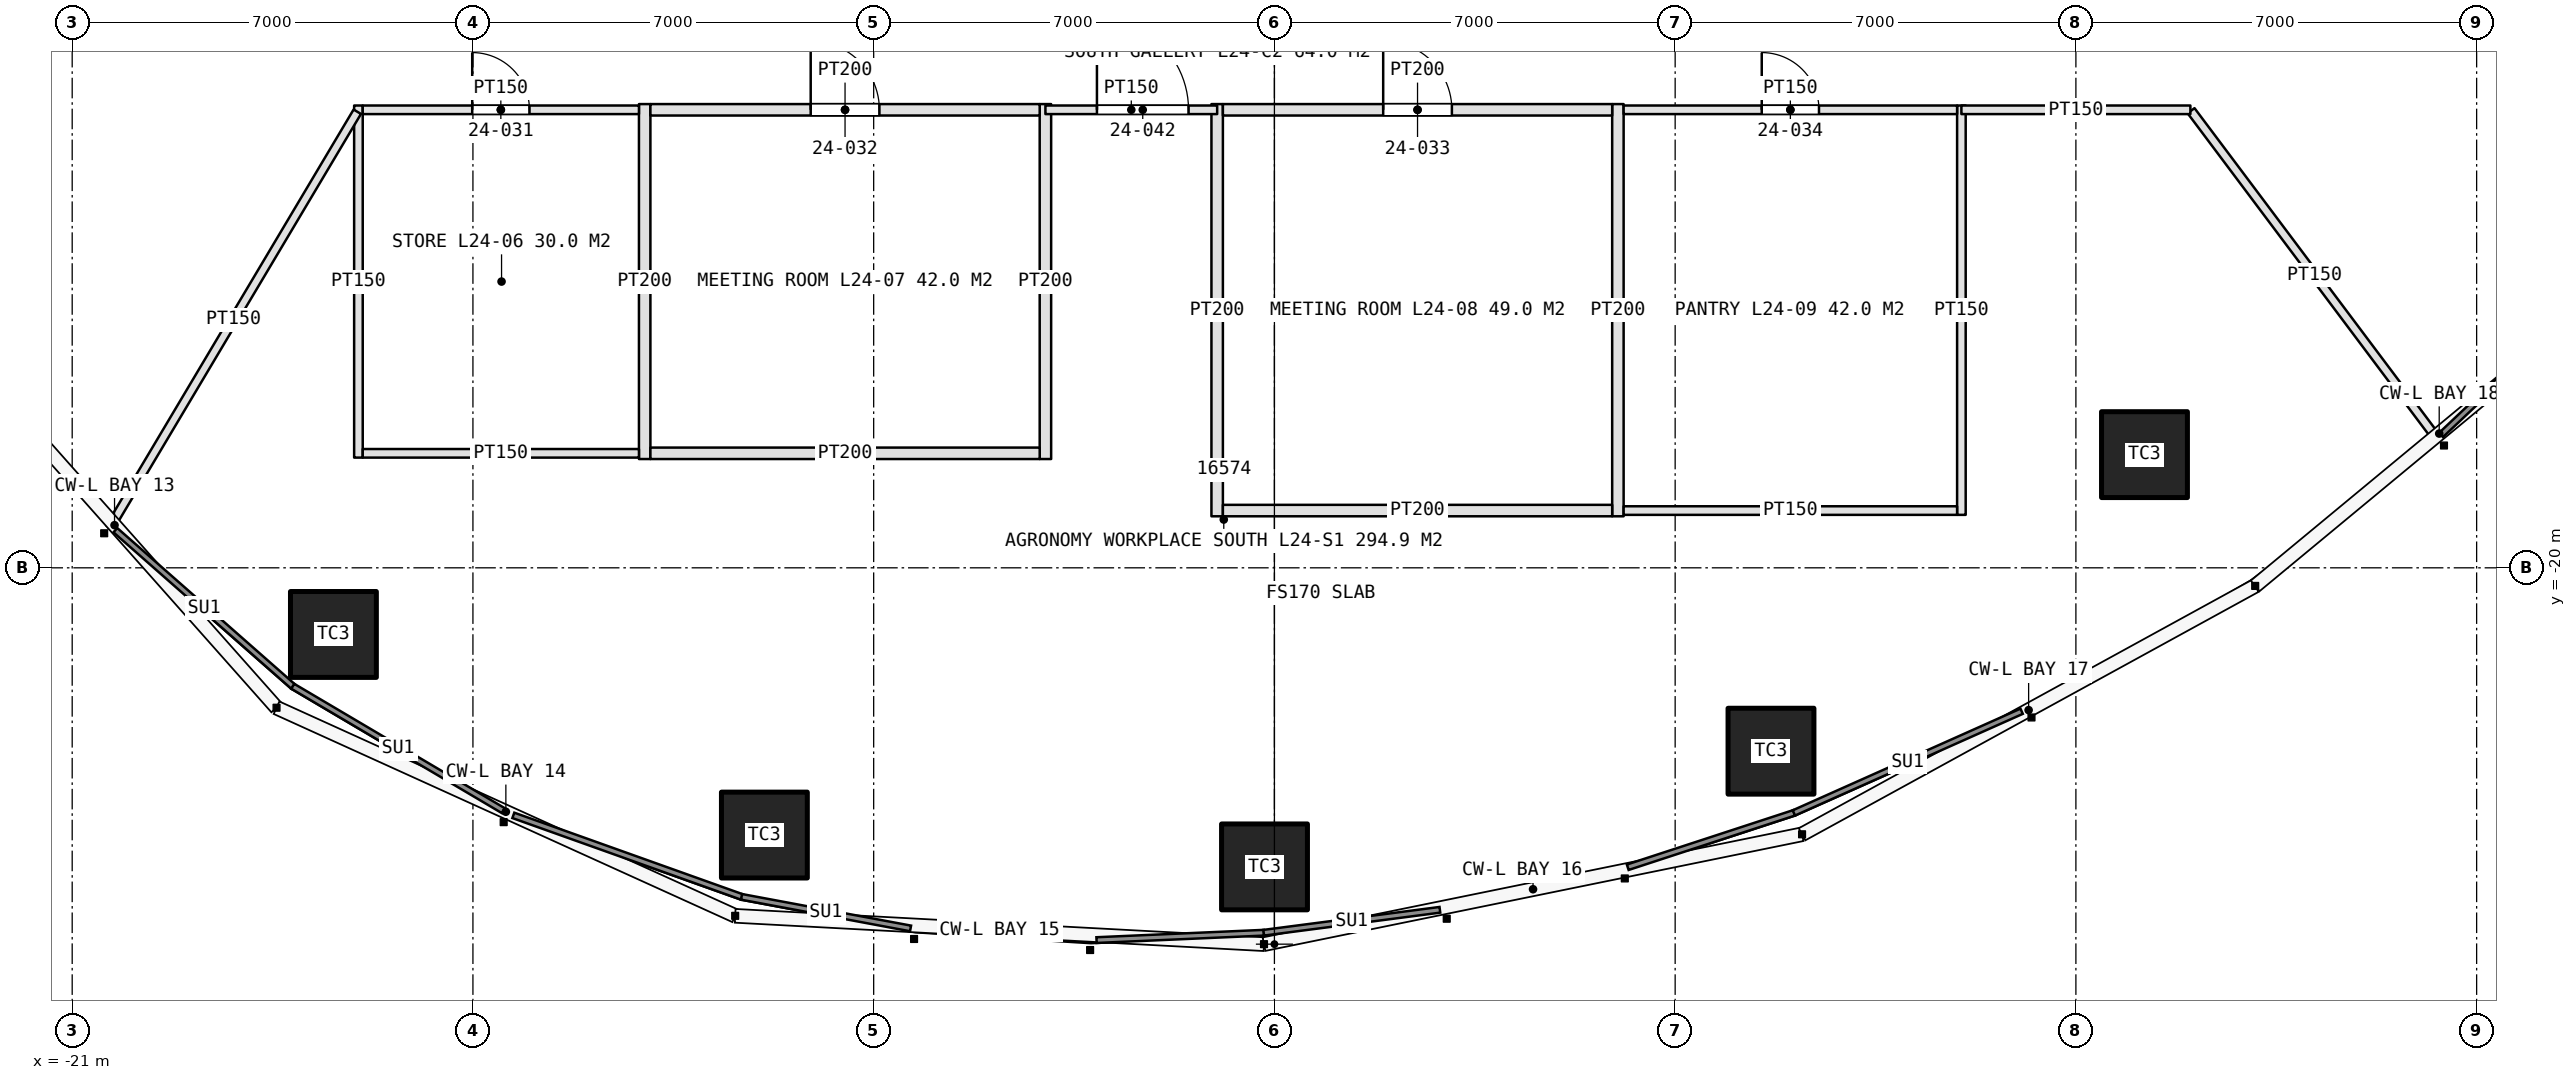
"""IFC4 building model, lengths in metres.
Left out: names, types, materials, properties, quantities, classifications, styles, units other than length and angle.
Written with IfcOpenShell. Run it as: python <this file> out.ifc"""

import sys

from ifc_helpers import new_model, si_unit, direction, frame, frame_2d, origin, origin_2d, place, context, subcontext, project, spatial, rectangle, extrude, element, fill, save


model = new_model("IFC4")
c1 = context("Model", 3, precision=1e-05, world=origin(), true_north=direction((0.0, 1.0)))
c2 = subcontext(c1, "Body", "Model", "MODEL_VIEW")
j1 = project(units=[si_unit("LENGTHUNIT", "METRE"), si_unit("PLANEANGLEUNIT", "RADIAN")], contexts=[c1])
p1 = place(None, origin())
s1 = spatial("IfcSite", under=j1, at=p1, CompositionType="ELEMENT")
p2 = place(p1, origin())
s2 = spatial("IfcBuilding", under=s1, at=p2, CompositionType="ELEMENT")
p3 = place(p2, frame((0.0, 0.0, 117.6)))
s3 = spatial("IfcBuildingStorey", under=s2, at=p3, CompositionType="ELEMENT", Elevation=117.6)
for number, where, z_axis, x_axis in (
    (1, (-16.437, -21.164, 0.0), (0.0, 0.0, 1.0), (1.0, 0.0, 0.0)),
    (2, (-8.909, -24.668, 0.0), (0.0, 0.0, 1.0), (1.0, 0.0, 0.0)),
    (3, (-0.173, -25.224, 0.0), (0.0, 0.0, 1.0), (1.0, 0.0, 0.0)),
    (4, (8.674, -23.203, 0.0), (0.0, 0.0, 1.0), (1.0, 0.0, 0.0)),
    (5, (15.198, -18.023, 0.0), (0.0, 0.0, 1.0), (1.0, 0.0, 0.0)),
):
    element("IfcColumn", number, at=place(p3, frame(where, z_axis=z_axis, x_axis=x_axis)), inside=s3, PredefinedType="COLUMN", context=c2, shape_type="SweptSolid", body=[
        extrude(rectangle(XDim=1.5, YDim=1.5, at=origin_2d()), origin(), (0.0, 0.0, 1.0), 4.2),
    ])
p4 = place(p3, frame((-16.0, -11.925, 0.0), z_axis=(0.0, 0.0, 1.0), x_axis=(0.0, -1.0, 0.0)))
e6 = element("IfcWall", 6, at=p4, inside=s3, PredefinedType="PARTITIONING", context=c2, shape_type="SweptSolid", body=[
    extrude(rectangle(XDim=6.15, YDim=0.15, at=frame_2d((3.075, 0.0))), origin(), (0.0, 0.0, 1.0), 3.0),
])
for number, where, z_axis, x_axis in (
    (7, (-11.0, -11.9, 0.0), (0.0, 0.0, 1.0), (0.0, -1.0, 0.0)),
    (8, (-4.0, -11.9, 0.0), (0.0, 0.0, 1.0), (0.0, -1.0, 0.0)),
):
    element("IfcWall", number, at=place(p3, frame(where, z_axis=z_axis, x_axis=x_axis)), inside=s3, PredefinedType="PARTITIONING", context=c2, shape_type="SweptSolid", body=[
        extrude(rectangle(XDim=6.2, YDim=0.2, at=frame_2d((3.1, 0.0))), origin(), (0.0, 0.0, 1.0), 3.0),
    ])
p5 = place(p3, frame((-15.925, -12.0, 0.0), z_axis=(0.0, 0.0, 1.0), x_axis=(1.0, 0.0, 0.0)))
e9 = element("IfcWall", 9, at=p5, inside=s3, PredefinedType="PARTITIONING", context=c2, shape_type="SweptSolid", body=[
    extrude(rectangle(XDim=4.825, YDim=0.15, at=frame_2d((2.413, 0.0))), origin(), (0.0, 0.0, 1.0), 3.0),
])
p6 = place(p5, frame((1.913, 0.0, 0.0)))
e10 = element("IfcOpeningElement", 10, at=p6, cuts=e9, PredefinedType="OPENING", context=c2, shape_type="SweptSolid", body=[
    extrude(rectangle(XDim=1.0, YDim=2.2, at=frame_2d((0.5, 1.1))), frame((0.0, 0.085, 0.0), z_axis=(0.0, -1.0, 0.0), x_axis=(1.0, 0.0, 0.0)), (0.0, 0.0, 1.0), 0.17),
])
p7 = place(p3, frame((-15.925, -18.0, 0.0), z_axis=(0.0, 0.0, 1.0), x_axis=(1.0, 0.0, 0.0)))
e11 = element("IfcWall", 11, at=p7, inside=s3, PredefinedType="PARTITIONING", context=c2, shape_type="SweptSolid", body=[
    extrude(rectangle(XDim=4.825, YDim=0.15, at=frame_2d((2.413, 0.0))), origin(), (0.0, 0.0, 1.0), 3.0),
])
p8 = place(p3, frame((-10.9, -12.0, 0.0), z_axis=(0.0, 0.0, 1.0), x_axis=(1.0, 0.0, 0.0)))
e12 = element("IfcWall", 12, at=p8, inside=s3, PredefinedType="PARTITIONING", context=c2, shape_type="SweptSolid", body=[
    extrude(rectangle(XDim=6.8, YDim=0.2, at=frame_2d((3.4, 0.0))), origin(), (0.0, 0.0, 1.0), 3.0),
])
p9 = place(p8, frame((2.8, 0.0, 0.0)))
e13 = element("IfcOpeningElement", 13, at=p9, cuts=e12, PredefinedType="OPENING", context=c2, shape_type="SweptSolid", body=[
    extrude(rectangle(XDim=1.2, YDim=2.4, at=frame_2d((0.6, 1.2))), frame((0.0, 0.11, 0.0), z_axis=(0.0, -1.0, 0.0), x_axis=(1.0, 0.0, 0.0)), (0.0, 0.0, 1.0), 0.22),
])
p10 = place(p3, frame((-10.9, -18.0, 0.0), z_axis=(0.0, 0.0, 1.0), x_axis=(1.0, 0.0, 0.0)))
e14 = element("IfcWall", 14, at=p10, inside=s3, PredefinedType="PARTITIONING", context=c2, shape_type="SweptSolid", body=[
    extrude(rectangle(XDim=6.8, YDim=0.2, at=frame_2d((3.4, 0.0))), origin(), (0.0, 0.0, 1.0), 3.0),
])
for number, where, z_axis, x_axis in (
    (15, (-1.0, -11.9, 0.0), (0.0, 0.0, 1.0), (0.0, -1.0, 0.0)),
    (16, (6.0, -11.9, 0.0), (0.0, 0.0, 1.0), (0.0, -1.0, 0.0)),
):
    element("IfcWall", number, at=place(p3, frame(where, z_axis=z_axis, x_axis=x_axis)), inside=s3, PredefinedType="PARTITIONING", context=c2, shape_type="SweptSolid", body=[
        extrude(rectangle(XDim=7.2, YDim=0.2, at=frame_2d((3.6, 0.0))), origin(), (0.0, 0.0, 1.0), 3.0),
    ])
p11 = place(p3, frame((12.0, -11.925, 0.0), z_axis=(0.0, 0.0, 1.0), x_axis=(0.0, -1.0, 0.0)))
e17 = element("IfcWall", 17, at=p11, inside=s3, PredefinedType="PARTITIONING", context=c2, shape_type="SweptSolid", body=[
    extrude(rectangle(XDim=7.15, YDim=0.15, at=frame_2d((3.575, 0.0))), origin(), (0.0, 0.0, 1.0), 3.0),
])
p12 = place(p3, frame((-0.9, -12.0, 0.0), z_axis=(0.0, 0.0, 1.0), x_axis=(1.0, 0.0, 0.0)))
e18 = element("IfcWall", 18, at=p12, inside=s3, PredefinedType="PARTITIONING", context=c2, shape_type="SweptSolid", body=[
    extrude(rectangle(XDim=6.8, YDim=0.2, at=frame_2d((3.4, 0.0))), origin(), (0.0, 0.0, 1.0), 3.0),
])
p13 = place(p12, frame((2.8, 0.0, 0.0)))
e19 = element("IfcOpeningElement", 19, at=p13, cuts=e18, PredefinedType="OPENING", context=c2, shape_type="SweptSolid", body=[
    extrude(rectangle(XDim=1.2, YDim=2.4, at=frame_2d((0.6, 1.2))), frame((0.0, 0.11, 0.0), z_axis=(0.0, -1.0, 0.0), x_axis=(1.0, 0.0, 0.0)), (0.0, 0.0, 1.0), 0.22),
])
p14 = place(p3, frame((-0.9, -19.0, 0.0), z_axis=(0.0, 0.0, 1.0), x_axis=(1.0, 0.0, 0.0)))
e20 = element("IfcWall", 20, at=p14, inside=s3, PredefinedType="PARTITIONING", context=c2, shape_type="SweptSolid", body=[
    extrude(rectangle(XDim=6.8, YDim=0.2, at=frame_2d((3.4, 0.0))), origin(), (0.0, 0.0, 1.0), 3.0),
])
p15 = place(p3, frame((6.1, -12.0, 0.0), z_axis=(0.0, 0.0, 1.0), x_axis=(1.0, 0.0, 0.0)))
e21 = element("IfcWall", 21, at=p15, inside=s3, PredefinedType="PARTITIONING", context=c2, shape_type="SweptSolid", body=[
    extrude(rectangle(XDim=5.825, YDim=0.15, at=frame_2d((2.913, 0.0))), origin(), (0.0, 0.0, 1.0), 3.0),
])
p16 = place(p15, frame((2.413, 0.0, 0.0)))
e22 = element("IfcOpeningElement", 22, at=p16, cuts=e21, PredefinedType="OPENING", context=c2, shape_type="SweptSolid", body=[
    extrude(rectangle(XDim=1.0, YDim=2.2, at=frame_2d((0.5, 1.1))), frame((0.0, 0.085, 0.0), z_axis=(0.0, -1.0, 0.0), x_axis=(1.0, 0.0, 0.0)), (0.0, 0.0, 1.0), 0.17),
])
p17 = place(p3, frame((6.1, -19.0, 0.0), z_axis=(0.0, 0.0, 1.0), x_axis=(1.0, 0.0, 0.0)))
e23 = element("IfcWall", 23, at=p17, inside=s3, PredefinedType="PARTITIONING", context=c2, shape_type="SweptSolid", body=[
    extrude(rectangle(XDim=5.825, YDim=0.15, at=frame_2d((2.913, 0.0))), origin(), (0.0, 0.0, 1.0), 3.0),
])
p18 = place(p3, frame((-16.02, -12.034, 0.0), z_axis=(0.0, 0.0, 1.0), x_axis=(-0.511518902153, -0.859272024879, 0.0)))
e24 = element("IfcWall", 24, at=p18, inside=s3, PredefinedType="PARTITIONING", context=c2, shape_type="SweptSolid", body=[
    extrude(rectangle(XDim=8.451, YDim=0.15, at=frame_2d((4.226, 0.0))), origin(), (0.0, 0.0, 1.0), 3.0),
])
p19 = place(p3, frame((16.012, -12.016, 0.0), z_axis=(0.0, 0.0, 1.0), x_axis=(0.600059749679, -0.799955184254, 0.0)))
e25 = element("IfcWall", 25, at=p19, inside=s3, PredefinedType="PARTITIONING", context=c2, shape_type="SweptSolid", body=[
    extrude(rectangle(XDim=7.191, YDim=0.15, at=frame_2d((3.596, 0.0))), origin(), (0.0, 0.0, 1.0), 3.0),
])
p20 = place(p3, frame((-4.0, -12.0, 0.0), z_axis=(0.0, 0.0, 1.0), x_axis=(1.0, 0.0, 0.0)))
e26 = element("IfcWall", 26, at=p20, inside=s3, PredefinedType="PARTITIONING", context=c2, shape_type="SweptSolid", body=[
    extrude(rectangle(XDim=3.0, YDim=0.15, at=frame_2d((1.5, 0.0))), origin(), (0.0, 0.0, 1.0), 3.0),
])
p21 = place(p20, frame((0.9, 0.0, 0.0)))
e27 = element("IfcOpeningElement", 27, at=p21, cuts=e26, PredefinedType="OPENING", context=c2, shape_type="SweptSolid", body=[
    extrude(rectangle(XDim=1.6, YDim=2.4, at=frame_2d((0.8, 1.2))), frame((0.0, 0.085, 0.0), z_axis=(0.0, -1.0, 0.0), x_axis=(1.0, 0.0, 0.0)), (0.0, 0.0, 1.0), 0.17),
])
p22 = place(p3, frame((12.0, -12.0, 0.0), z_axis=(0.0, 0.0, 1.0), x_axis=(1.0, 0.0, 0.0)))
e28 = element("IfcWall", 28, at=p22, inside=s3, PredefinedType="PARTITIONING", context=c2, shape_type="SweptSolid", body=[
    extrude(rectangle(XDim=4.0, YDim=0.15, at=frame_2d((2.0, 0.0))), origin(), (0.0, 0.0, 1.0), 3.0),
])
p23 = place(p6, origin())
e29 = element("IfcDoor", 29, at=p23, inside=s3, OperationType="SINGLE_SWING_LEFT", PredefinedType="DOOR", context=c2, shape_type="SweptSolid", body=[
    extrude(rectangle(XDim=1.0, YDim=2.2, at=frame_2d((0.5, 1.1))), frame((0.0, 0.025, 0.0), z_axis=(0.0, -1.0, 0.0), x_axis=(1.0, 0.0, 0.0)), (0.0, 0.0, 1.0), 0.05),
])
fill(e10, e29)
p24 = place(p9, origin())
e30 = element("IfcDoor", 30, at=p24, inside=s3, OperationType="SINGLE_SWING_LEFT", PredefinedType="DOOR", context=c2, shape_type="SweptSolid", body=[
    extrude(rectangle(XDim=1.2, YDim=2.4, at=frame_2d((0.6, 1.2))), frame((0.0, 0.025, 0.0), z_axis=(0.0, -1.0, 0.0), x_axis=(1.0, 0.0, 0.0)), (0.0, 0.0, 1.0), 0.05),
])
fill(e13, e30)
p25 = place(p13, origin())
e31 = element("IfcDoor", 31, at=p25, inside=s3, OperationType="SINGLE_SWING_LEFT", PredefinedType="DOOR", context=c2, shape_type="SweptSolid", body=[
    extrude(rectangle(XDim=1.2, YDim=2.4, at=frame_2d((0.6, 1.2))), frame((0.0, 0.025, 0.0), z_axis=(0.0, -1.0, 0.0), x_axis=(1.0, 0.0, 0.0)), (0.0, 0.0, 1.0), 0.05),
])
fill(e19, e31)
p26 = place(p16, origin())
e32 = element("IfcDoor", 32, at=p26, inside=s3, OperationType="SINGLE_SWING_LEFT", PredefinedType="DOOR", context=c2, shape_type="SweptSolid", body=[
    extrude(rectangle(XDim=1.0, YDim=2.2, at=frame_2d((0.5, 1.1))), frame((0.0, 0.025, 0.0), z_axis=(0.0, -1.0, 0.0), x_axis=(1.0, 0.0, 0.0)), (0.0, 0.0, 1.0), 0.05),
])
fill(e22, e32)
p27 = place(p21, origin())
e33 = element("IfcDoor", 33, at=p27, inside=s3, OperationType="DOUBLE_DOOR_SINGLE_SWING", PredefinedType="DOOR", context=c2, shape_type="SweptSolid", body=[
    extrude(rectangle(XDim=1.6, YDim=2.4, at=frame_2d((0.8, 1.2))), frame((0.0, 0.025, 0.0), z_axis=(0.0, -1.0, 0.0), x_axis=(1.0, 0.0, 0.0)), (0.0, 0.0, 1.0), 0.05),
])
fill(e27, e33)
save(model, sys.argv[1])
